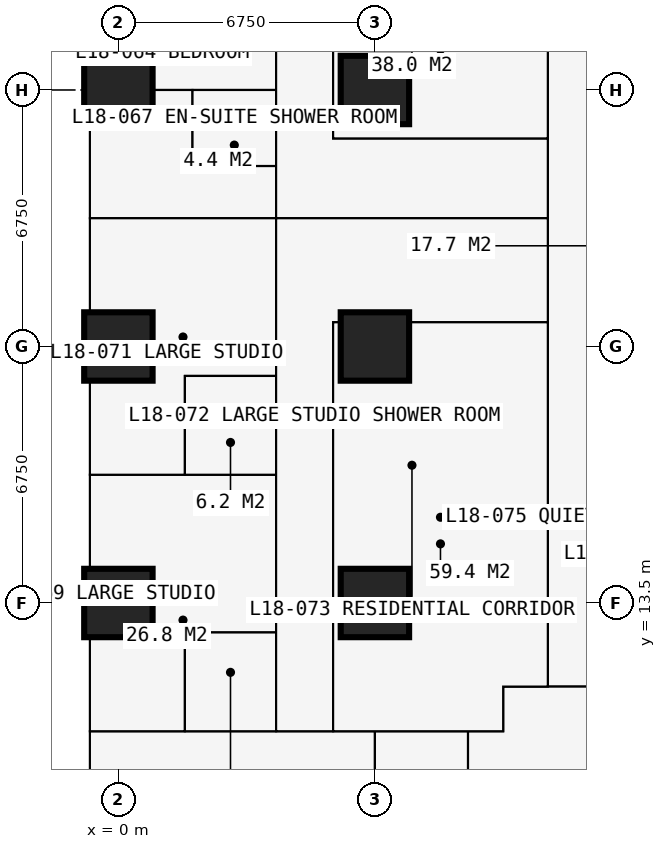
"""IFC4 building model, lengths in metres.
Left out: names, types, materials, properties, quantities, classifications, styles, units other than length and angle.
Written with IfcOpenShell. Run it as: python <this file> out.ifc"""

import sys

from ifc_helpers import new_model, si_unit, direction, frame, frame_2d, origin, origin_2d, place, context, subcontext, project, spatial, rectangle, extrude, element, fill, save


model = new_model("IFC4")
c1 = context("Model", 3, precision=1e-05, world=origin(), true_north=direction((0.0, 1.0)))
c2 = subcontext(c1, "Body", "Model", "MODEL_VIEW")
j1 = project(units=[si_unit("LENGTHUNIT", "METRE"), si_unit("PLANEANGLEUNIT", "RADIAN")], contexts=[c1])
p1 = place(None, origin())
s1 = spatial("IfcSite", under=j1, at=p1, CompositionType="ELEMENT")
p2 = place(p1, origin())
s2 = spatial("IfcBuilding", under=s1, at=p2, CompositionType="ELEMENT")
p3 = place(p2, frame((0.0, 0.0, 68.4)))
s3 = spatial("IfcBuildingStorey", under=s2, at=p3, CompositionType="ELEMENT", Elevation=68.4)
for number, where, z_axis, x_axis in (
    (1, (0.0, 13.5, 0.0), (0.0, 0.0, 1.0), (1.0, 0.0, 0.0)),
    (2, (0.0, 20.25, 0.0), (0.0, 0.0, 1.0), (1.0, 0.0, 0.0)),
    (3, (0.0, 27.0, 0.0), (0.0, 0.0, 1.0), (1.0, 0.0, 0.0)),
    (4, (6.75, 13.5, 0.0), (0.0, 0.0, 1.0), (1.0, 0.0, 0.0)),
    (5, (6.75, 20.25, 0.0), (0.0, 0.0, 1.0), (1.0, 0.0, 0.0)),
    (6, (6.75, 27.0, 0.0), (0.0, 0.0, 1.0), (1.0, 0.0, 0.0)),
):
    element("IfcColumn", number, at=place(p3, frame(where, z_axis=z_axis, x_axis=x_axis)), inside=s3, PredefinedType="COLUMN", context=c2, shape_type="SweptSolid", body=[
        extrude(rectangle(XDim=1.8, YDim=1.8, at=origin_2d()), origin(), (0.0, 0.0, 1.0), 3.6),
    ])
p4 = place(p3, frame((-0.75, 13.5, 0.0), z_axis=(0.0, 0.0, 1.0), x_axis=(0.0, 1.0, 0.0)))
e7 = element("IfcWall", 7, at=p4, inside=s3, PredefinedType="SOLIDWALL", context=c2, shape_type="SweptSolid", body=[
    extrude(rectangle(XDim=6.75, YDim=0.15, at=frame_2d((3.375, 0.0))), origin(), (0.0, 0.0, 1.0), 3.375),
])
p5 = place(p4, frame((0.962, 0.0, 0.0)))
e8 = element("IfcOpeningElement", 8, at=p5, cuts=e7, PredefinedType="OPENING", context=c2, shape_type="SweptSolid", body=[
    extrude(rectangle(XDim=1.0, YDim=2.2, at=frame_2d((0.5, 1.1))), frame((0.0, 0.085, 0.0), z_axis=(0.0, -1.0, 0.0), x_axis=(1.0, 0.0, 0.0)), (0.0, 0.0, 1.0), 0.17),
])
p6 = place(p4, frame((2.025, 0.0, 0.9)))
e9 = element("IfcOpeningElement", 9, at=p6, cuts=e7, PredefinedType="OPENING", context=c2, shape_type="SweptSolid", body=[
    extrude(rectangle(XDim=1.2, YDim=1.8, at=frame_2d((0.6, 0.9))), frame((0.0, 0.085, 0.0), z_axis=(0.0, -1.0, 0.0), x_axis=(1.0, 0.0, 0.0)), (0.0, 0.0, 1.0), 0.17),
])
p7 = place(p4, frame((4.788, 0.0, 0.0)))
e10 = element("IfcOpeningElement", 10, at=p7, cuts=e7, PredefinedType="OPENING", context=c2, shape_type="SweptSolid", body=[
    extrude(rectangle(XDim=1.0, YDim=2.2, at=frame_2d((0.5, 1.1))), frame((0.0, 0.085, 0.0), z_axis=(0.0, -1.0, 0.0), x_axis=(1.0, 0.0, 0.0)), (0.0, 0.0, 1.0), 0.17),
])
p8 = place(p4, frame((3.525, 0.0, 0.9)))
e11 = element("IfcOpeningElement", 11, at=p8, cuts=e7, PredefinedType="OPENING", context=c2, shape_type="SweptSolid", body=[
    extrude(rectangle(XDim=1.2, YDim=1.8, at=frame_2d((0.6, 0.9))), frame((0.0, 0.085, 0.0), z_axis=(0.0, -1.0, 0.0), x_axis=(1.0, 0.0, 0.0)), (0.0, 0.0, 1.0), 0.17),
])
p9 = place(p3, frame((-0.85, 16.875, 0.0), z_axis=(0.0, 0.0, 1.0), x_axis=(-1.0, 0.0, 0.0)))
e12 = element("IfcWall", 12, at=p9, inside=s3, PredefinedType="USERDEFINED", context=c2, shape_type="SweptSolid", body=[
    extrude(rectangle(XDim=2.2, YDim=1.0, at=frame_2d((1.1, 0.0))), origin(), (0.0, 0.0, 1.0), 0.9),
])
p10 = place(p3, frame((-0.734, 10.125, 0.0), z_axis=(0.0, 0.0, 1.0), x_axis=(1.0, 0.0, 0.0)))
e13 = element("IfcWall", 13, at=p10, inside=s3, PredefinedType="PARTITIONING", context=c2, shape_type="SweptSolid", body=[
    extrude(rectangle(XDim=10.859, YDim=0.15, at=frame_2d((5.429, 0.0))), origin(), (0.0, 0.0, 1.0), 3.375),
])
p11 = place(p10, frame((5.134, 0.0, 0.0)))
e14 = element("IfcOpeningElement", 14, at=p11, cuts=e13, PredefinedType="OPENING", context=c2, shape_type="SweptSolid", body=[
    extrude(rectangle(XDim=1.0, YDim=2.2, at=frame_2d((0.5, 1.1))), frame((0.0, 0.085, 0.0), z_axis=(0.0, -1.0, 0.0), x_axis=(1.0, 0.0, 0.0)), (0.0, 0.0, 1.0), 0.17),
])
p12 = place(p3, frame((-0.734, 16.875, 0.0), z_axis=(0.0, 0.0, 1.0), x_axis=(1.0, 0.0, 0.0)))
e15 = element("IfcWall", 15, at=p12, inside=s3, PredefinedType="PARTITIONING", context=c2, shape_type="SweptSolid", body=[
    extrude(rectangle(XDim=4.884, YDim=0.175, at=frame_2d((2.442, 0.0))), origin(), (0.0, 0.0, 1.0), 3.375),
])
p13 = place(p12, frame((3.234, 0.0, 0.0)))
e16 = element("IfcOpeningElement", 16, at=p13, cuts=e15, PredefinedType="OPENING", context=c2, shape_type="SweptSolid", body=[
    extrude(rectangle(XDim=0.9, YDim=2.2, at=frame_2d((0.45, 1.1))), frame((0.0, 0.097, 0.0), z_axis=(0.0, -1.0, 0.0), x_axis=(1.0, 0.0, 0.0)), (0.0, 0.0, 1.0), 0.195),
])
p14 = place(p3, frame((-0.734, 23.625, 0.0), z_axis=(0.0, 0.0, 1.0), x_axis=(1.0, 0.0, 0.0)))
e17 = element("IfcWall", 17, at=p14, inside=s3, PredefinedType="PARTITIONING", context=c2, shape_type="SweptSolid", body=[
    extrude(rectangle(XDim=12.034, YDim=0.15, at=frame_2d((6.017, 0.0))), origin(), (0.0, 0.0, 1.0), 3.375),
])
p15 = place(p3, frame((-0.734, 27.0, 0.0), z_axis=(0.0, 0.0, 1.0), x_axis=(1.0, 0.0, 0.0)))
e18 = element("IfcWall", 18, at=p15, inside=s3, PredefinedType="PARTITIONING", context=c2, shape_type="SweptSolid", body=[
    extrude(rectangle(XDim=4.884, YDim=0.175, at=frame_2d((2.442, 0.0))), origin(), (0.0, 0.0, 1.0), 2.61),
])
p16 = place(p15, frame((3.334, 0.0, 0.0)))
e19 = element("IfcOpeningElement", 19, at=p16, cuts=e18, PredefinedType="OPENING", context=c2, shape_type="SweptSolid", body=[
    extrude(rectangle(XDim=0.9, YDim=2.2, at=frame_2d((0.45, 1.1))), frame((0.0, 0.097, 0.0), z_axis=(0.0, -1.0, 0.0), x_axis=(1.0, 0.0, 0.0)), (0.0, 0.0, 1.0), 0.195),
])
p17 = place(p3, frame((1.75, 10.125, 0.0), z_axis=(0.0, 0.0, 1.0), x_axis=(0.0, 1.0, 0.0)))
e20 = element("IfcWall", 20, at=p17, inside=s3, PredefinedType="PARTITIONING", context=c2, shape_type="SweptSolid", body=[
    extrude(rectangle(XDim=2.6, YDim=0.1, at=frame_2d((1.3, 0.0))), origin(), (0.0, 0.0, 1.0), 3.375),
])
p18 = place(p17, frame((0.85, 0.0, 0.0)))
e21 = element("IfcOpeningElement", 21, at=p18, cuts=e20, PredefinedType="OPENING", context=c2, shape_type="SweptSolid", body=[
    extrude(rectangle(XDim=0.9, YDim=2.2, at=frame_2d((0.45, 1.1))), frame((0.0, 0.06, 0.0), z_axis=(0.0, -1.0, 0.0), x_axis=(1.0, 0.0, 0.0)), (0.0, 0.0, 1.0), 0.12),
])
p19 = place(p3, frame((1.75, 12.725, 0.0), z_axis=(0.0, 0.0, 1.0), x_axis=(1.0, 0.0, 0.0)))
e22 = element("IfcWall", 22, at=p19, inside=s3, PredefinedType="PARTITIONING", context=c2, shape_type="SweptSolid", body=[
    extrude(rectangle(XDim=2.4, YDim=0.1, at=frame_2d((1.2, 0.0))), origin(), (0.0, 0.0, 1.0), 3.375),
])
p20 = place(p3, frame((1.75, 16.875, 0.0), z_axis=(0.0, 0.0, 1.0), x_axis=(0.0, 1.0, 0.0)))
e23 = element("IfcWall", 23, at=p20, inside=s3, PredefinedType="PARTITIONING", context=c2, shape_type="SweptSolid", body=[
    extrude(rectangle(XDim=2.6, YDim=0.1, at=frame_2d((1.3, 0.0))), origin(), (0.0, 0.0, 1.0), 3.375),
])
p21 = place(p3, frame((1.75, 19.475, 0.0), z_axis=(0.0, 0.0, 1.0), x_axis=(1.0, 0.0, 0.0)))
e24 = element("IfcWall", 24, at=p21, inside=s3, PredefinedType="PARTITIONING", context=c2, shape_type="SweptSolid", body=[
    extrude(rectangle(XDim=2.4, YDim=0.1, at=frame_2d((1.2, 0.0))), origin(), (0.0, 0.0, 1.0), 3.375),
])
p22 = place(p3, frame((1.95, 25.0, 0.0), z_axis=(0.0, 0.0, 1.0), x_axis=(0.0, 1.0, 0.0)))
e25 = element("IfcWall", 25, at=p22, inside=s3, PredefinedType="PARTITIONING", context=c2, shape_type="SweptSolid", body=[
    extrude(rectangle(XDim=2.0, YDim=0.1, at=frame_2d((1.0, 0.0))), origin(), (0.0, 0.0, 1.0), 3.375),
])
p23 = place(p3, frame((1.95, 25.0, 0.0), z_axis=(0.0, 0.0, 1.0), x_axis=(1.0, 0.0, 0.0)))
e26 = element("IfcWall", 26, at=p23, inside=s3, PredefinedType="PARTITIONING", context=c2, shape_type="SweptSolid", body=[
    extrude(rectangle(XDim=2.2, YDim=0.1, at=frame_2d((1.1, 0.0))), origin(), (0.0, 0.0, 1.0), 3.375),
])
p24 = place(p3, frame((4.15, 10.125, 0.0), z_axis=(0.0, 0.0, 1.0), x_axis=(0.0, 1.0, 0.0)))
e27 = element("IfcWall", 27, at=p24, inside=s3, PredefinedType="PARTITIONING", context=c2, shape_type="SweptSolid", body=[
    extrude(rectangle(XDim=23.625, YDim=0.15, at=frame_2d((11.812, 0.0))), origin(), (0.0, 0.0, 1.0), 3.375),
])
p25 = place(p24, frame((20.5, 0.0, 0.0)))
e28 = element("IfcOpeningElement", 28, at=p25, cuts=e27, PredefinedType="OPENING", context=c2, shape_type="SweptSolid", body=[
    extrude(rectangle(XDim=0.95, YDim=2.2, at=frame_2d((0.475, 1.1))), frame((0.0, 0.085, 0.0), z_axis=(0.0, -1.0, 0.0), x_axis=(1.0, 0.0, 0.0)), (0.0, 0.0, 1.0), 0.17),
])
p26 = place(p24, frame((17.125, 0.0, 0.0)))
e29 = element("IfcOpeningElement", 29, at=p26, cuts=e27, PredefinedType="OPENING", context=c2, shape_type="SweptSolid", body=[
    extrude(rectangle(XDim=0.95, YDim=2.2, at=frame_2d((0.475, 1.1))), frame((0.0, 0.085, 0.0), z_axis=(0.0, -1.0, 0.0), x_axis=(1.0, 0.0, 0.0)), (0.0, 0.0, 1.0), 0.17),
])
p27 = place(p24, frame((13.7, 0.0, 0.0)))
e30 = element("IfcOpeningElement", 30, at=p27, cuts=e27, PredefinedType="OPENING", context=c2, shape_type="SweptSolid", body=[
    extrude(rectangle(XDim=0.95, YDim=2.2, at=frame_2d((0.475, 1.1))), frame((0.0, 0.085, 0.0), z_axis=(0.0, -1.0, 0.0), x_axis=(1.0, 0.0, 0.0)), (0.0, 0.0, 1.0), 0.17),
])
p28 = place(p24, frame((4.2, 0.0, 0.0)))
e31 = element("IfcOpeningElement", 31, at=p28, cuts=e27, PredefinedType="OPENING", context=c2, shape_type="SweptSolid", body=[
    extrude(rectangle(XDim=0.95, YDim=2.2, at=frame_2d((0.475, 1.1))), frame((0.0, 0.085, 0.0), z_axis=(0.0, -1.0, 0.0), x_axis=(1.0, 0.0, 0.0)), (0.0, 0.0, 1.0), 0.17),
])
p29 = place(p24, frame((10.95, 0.0, 0.0)))
e32 = element("IfcOpeningElement", 32, at=p29, cuts=e27, PredefinedType="OPENING", context=c2, shape_type="SweptSolid", body=[
    extrude(rectangle(XDim=0.95, YDim=2.2, at=frame_2d((0.475, 1.1))), frame((0.0, 0.085, 0.0), z_axis=(0.0, -1.0, 0.0), x_axis=(1.0, 0.0, 0.0)), (0.0, 0.0, 1.0), 0.17),
])
p30 = place(p3, frame((5.65, 10.125, 0.0), z_axis=(0.0, 0.0, 1.0), x_axis=(0.0, 1.0, 0.0)))
e33 = element("IfcWall", 33, at=p30, inside=s3, PredefinedType="PARTITIONING", context=c2, shape_type="SweptSolid", body=[
    extrude(rectangle(XDim=10.762, YDim=0.15, at=frame_2d((5.381, 0.0))), origin(), (0.0, 0.0, 1.0), 3.375),
])
p31 = place(p30, frame((4.9, 0.0, 0.0)))
e34 = element("IfcOpeningElement", 34, at=p31, cuts=e33, PredefinedType="OPENING", context=c2, shape_type="SweptSolid", body=[
    extrude(rectangle(XDim=0.95, YDim=2.2, at=frame_2d((0.475, 1.1))), frame((0.0, 0.085, 0.0), z_axis=(0.0, -1.0, 0.0), x_axis=(1.0, 0.0, 0.0)), (0.0, 0.0, 1.0), 0.17),
])
p32 = place(p3, frame((5.65, 20.887, 0.0), z_axis=(0.0, 0.0, 1.0), x_axis=(1.0, 0.0, 0.0)))
e35 = element("IfcWall", 35, at=p32, inside=s3, PredefinedType="PARTITIONING", context=c2, shape_type="SweptSolid", body=[
    extrude(rectangle(XDim=5.65, YDim=0.15, at=frame_2d((2.825, 0.0))), origin(), (0.0, 0.0, 1.0), 3.375),
])
p33 = place(p3, frame((5.65, 25.725, 0.0), z_axis=(0.0, 0.0, 1.0), x_axis=(0.0, 1.0, 0.0)))
e36 = element("IfcWall", 36, at=p33, inside=s3, PredefinedType="PARTITIONING", context=c2, shape_type="SweptSolid", body=[
    extrude(rectangle(XDim=5.575, YDim=0.15, at=frame_2d((2.788, 0.0))), origin(), (0.0, 0.0, 1.0), 3.375),
])
p34 = place(p3, frame((5.65, 25.725, 0.0), z_axis=(0.0, 0.0, 1.0), x_axis=(1.0, 0.0, 0.0)))
e37 = element("IfcWall", 37, at=p34, inside=s3, PredefinedType="PARTITIONING", context=c2, shape_type="SweptSolid", body=[
    extrude(rectangle(XDim=5.65, YDim=0.15, at=frame_2d((2.825, 0.0))), origin(), (0.0, 0.0, 1.0), 3.375),
])
p35 = place(p3, frame((6.75, -0.734, 0.0), z_axis=(0.0, 0.0, 1.0), x_axis=(0.0, 1.0, 0.0)))
e38 = element("IfcWall", 38, at=p35, inside=s3, PredefinedType="PARTITIONING", context=c2, shape_type="SweptSolid", body=[
    extrude(rectangle(XDim=10.859, YDim=0.15, at=frame_2d((5.429, 0.0))), origin(), (0.0, 0.0, 1.0), 2.877),
])
p36 = place(p3, frame((9.2, 5.65, 0.0), z_axis=(0.0, 0.0, 1.0), x_axis=(0.0, 1.0, 0.0)))
e39 = element("IfcWall", 39, at=p36, inside=s3, PredefinedType="PARTITIONING", context=c2, shape_type="SweptSolid", body=[
    extrude(rectangle(XDim=4.475, YDim=0.15, at=frame_2d((2.238, 0.0))), origin(), (0.0, 0.0, 1.0), 3.375),
])
p37 = place(p3, frame((10.125, 10.125, 0.0), z_axis=(0.0, 0.0, 1.0), x_axis=(0.0, 1.0, 0.0)))
e40 = element("IfcWall", 40, at=p37, inside=s3, PredefinedType="PARTITIONING", context=c2, shape_type="SweptSolid", body=[
    extrude(rectangle(XDim=1.175, YDim=0.15, at=frame_2d((0.587, 0.0))), origin(), (0.0, 0.0, 1.0), 3.375),
])
p38 = place(p3, frame((10.125, 11.3, 0.0), z_axis=(0.0, 0.0, 1.0), x_axis=(1.0, 0.0, 0.0)))
e41 = element("IfcWall", 41, at=p38, inside=s3, PredefinedType="PARTITIONING", context=c2, shape_type="SweptSolid", body=[
    extrude(rectangle(XDim=20.675, YDim=0.15, at=frame_2d((10.337, 0.0))), origin(), (0.0, 0.0, 1.0), 3.375),
])
p39 = place(p38, frame((8.375, 0.0, 0.0)))
e42 = element("IfcOpeningElement", 42, at=p39, cuts=e41, PredefinedType="OPENING", context=c2, shape_type="SweptSolid", body=[
    extrude(rectangle(XDim=1.0, YDim=2.2, at=frame_2d((0.5, 1.1))), frame((0.0, 0.085, 0.0), z_axis=(0.0, -1.0, 0.0), x_axis=(1.0, 0.0, 0.0)), (0.0, 0.0, 1.0), 0.17),
])
p40 = place(p38, frame((10.975, 0.0, 0.0)))
e43 = element("IfcOpeningElement", 43, at=p40, cuts=e41, PredefinedType="OPENING", context=c2, shape_type="SweptSolid", body=[
    extrude(rectangle(XDim=1.0, YDim=2.2, at=frame_2d((0.5, 1.1))), frame((0.0, 0.085, 0.0), z_axis=(0.0, -1.0, 0.0), x_axis=(1.0, 0.0, 0.0)), (0.0, 0.0, 1.0), 0.17),
])
p41 = place(p38, frame((3.925, 0.0, 0.0)))
e44 = element("IfcOpeningElement", 44, at=p41, cuts=e41, PredefinedType="OPENING", context=c2, shape_type="SweptSolid", body=[
    extrude(rectangle(XDim=0.95, YDim=2.2, at=frame_2d((0.475, 1.1))), frame((0.0, 0.085, 0.0), z_axis=(0.0, -1.0, 0.0), x_axis=(1.0, 0.0, 0.0)), (0.0, 0.0, 1.0), 0.17),
])
p42 = place(p3, frame((11.3, 11.3, 0.0), z_axis=(0.0, 0.0, 1.0), x_axis=(0.0, 1.0, 0.0)))
e45 = element("IfcWall", 45, at=p42, inside=s3, PredefinedType="PARTITIONING", context=c2, shape_type="SweptSolid", body=[
    extrude(rectangle(XDim=19.075, YDim=0.15, at=frame_2d((9.538, 0.0))), origin(), (0.0, 0.0, 1.0), 3.375),
])
p43 = place(p42, frame((12.875, 0.0, 0.0)))
e46 = element("IfcOpeningElement", 46, at=p43, cuts=e45, PredefinedType="OPENING", context=c2, shape_type="SweptSolid", body=[
    extrude(rectangle(XDim=1.0, YDim=2.2, at=frame_2d((0.5, 1.1))), frame((0.0, 0.085, 0.0), z_axis=(0.0, -1.0, 0.0), x_axis=(1.0, 0.0, 0.0)), (0.0, 0.0, 1.0), 0.17),
])
p44 = place(p42, frame((10.438, 0.0, 0.0)))
e47 = element("IfcOpeningElement", 47, at=p44, cuts=e45, PredefinedType="OPENING", context=c2, shape_type="SweptSolid", body=[
    extrude(rectangle(XDim=1.0, YDim=2.2, at=frame_2d((0.5, 1.1))), frame((0.0, 0.085, 0.0), z_axis=(0.0, -1.0, 0.0), x_axis=(1.0, 0.0, 0.0)), (0.0, 0.0, 1.0), 0.17),
])
p45 = place(p42, frame((15.675, 0.0, 0.0)))
e48 = element("IfcOpeningElement", 48, at=p45, cuts=e45, PredefinedType="OPENING", context=c2, shape_type="SweptSolid", body=[
    extrude(rectangle(XDim=0.95, YDim=2.2, at=frame_2d((0.475, 1.1))), frame((0.0, 0.085, 0.0), z_axis=(0.0, -1.0, 0.0), x_axis=(1.0, 0.0, 0.0)), (0.0, 0.0, 1.0), 0.17),
])
p46 = place(p5, origin())
e49 = element("IfcDoor", 49, at=p46, inside=s3, OperationType="SINGLE_SWING_LEFT", PredefinedType="DOOR", context=c2, shape_type="SweptSolid", body=[
    extrude(rectangle(XDim=1.0, YDim=2.2, at=frame_2d((0.5, 1.1))), frame((0.0, 0.025, 0.0), z_axis=(0.0, -1.0, 0.0), x_axis=(1.0, 0.0, 0.0)), (0.0, 0.0, 1.0), 0.05),
])
fill(e8, e49)
p47 = place(p6, origin())
e50 = element("IfcWindow", 50, at=p47, inside=s3, PartitioningType="SINGLE_PANEL", PredefinedType="WINDOW", context=c2, shape_type="SweptSolid", body=[
    extrude(rectangle(XDim=1.2, YDim=1.8, at=frame_2d((0.6, 0.9))), frame((0.0, 0.03, 0.0), z_axis=(0.0, -1.0, 0.0), x_axis=(1.0, 0.0, 0.0)), (0.0, 0.0, 1.0), 0.06),
])
fill(e9, e50)
p48 = place(p7, origin())
e51 = element("IfcDoor", 51, at=p48, inside=s3, OperationType="SINGLE_SWING_RIGHT", PredefinedType="DOOR", context=c2, shape_type="SweptSolid", body=[
    extrude(rectangle(XDim=1.0, YDim=2.2, at=frame_2d((0.5, 1.1))), frame((0.0, 0.025, 0.0), z_axis=(0.0, -1.0, 0.0), x_axis=(1.0, 0.0, 0.0)), (0.0, 0.0, 1.0), 0.05),
])
fill(e10, e51)
p49 = place(p8, origin())
e52 = element("IfcWindow", 52, at=p49, inside=s3, PartitioningType="SINGLE_PANEL", PredefinedType="WINDOW", context=c2, shape_type="SweptSolid", body=[
    extrude(rectangle(XDim=1.2, YDim=1.8, at=frame_2d((0.6, 0.9))), frame((0.0, 0.03, 0.0), z_axis=(0.0, -1.0, 0.0), x_axis=(1.0, 0.0, 0.0)), (0.0, 0.0, 1.0), 0.06),
])
fill(e11, e52)
p50 = place(p11, origin())
e53 = element("IfcDoor", 53, at=p50, inside=s3, OperationType="SINGLE_SWING_LEFT", PredefinedType="DOOR", context=c2, shape_type="SweptSolid", body=[
    extrude(rectangle(XDim=1.0, YDim=2.2, at=frame_2d((0.5, 1.1))), frame((0.0, 0.025, 0.0), z_axis=(0.0, -1.0, 0.0), x_axis=(1.0, 0.0, 0.0)), (0.0, 0.0, 1.0), 0.05),
])
fill(e14, e53)
p51 = place(p26, origin())
e54 = element("IfcDoor", 54, at=p51, inside=s3, OperationType="SINGLE_SWING_LEFT", PredefinedType="DOOR", context=c2, shape_type="SweptSolid", body=[
    extrude(rectangle(XDim=0.95, YDim=2.2, at=frame_2d((0.475, 1.1))), frame((0.0, 0.025, 0.0), z_axis=(0.0, -1.0, 0.0), x_axis=(1.0, 0.0, 0.0)), (0.0, 0.0, 1.0), 0.05),
])
fill(e29, e54)
p52 = place(p27, origin())
e55 = element("IfcDoor", 55, at=p52, inside=s3, OperationType="SINGLE_SWING_LEFT", PredefinedType="DOOR", context=c2, shape_type="SweptSolid", body=[
    extrude(rectangle(XDim=0.95, YDim=2.2, at=frame_2d((0.475, 1.1))), frame((0.0, 0.025, 0.0), z_axis=(0.0, -1.0, 0.0), x_axis=(1.0, 0.0, 0.0)), (0.0, 0.0, 1.0), 0.05),
])
fill(e30, e55)
p53 = place(p16, origin())
e56 = element("IfcDoor", 56, at=p53, inside=s3, OperationType="SINGLE_SWING_RIGHT", PredefinedType="DOOR", context=c2, shape_type="SweptSolid", body=[
    extrude(rectangle(XDim=0.9, YDim=2.2, at=frame_2d((0.45, 1.1))), frame((0.0, 0.025, 0.0), z_axis=(0.0, -1.0, 0.0), x_axis=(1.0, 0.0, 0.0)), (0.0, 0.0, 1.0), 0.05),
])
fill(e19, e56)
p54 = place(p43, origin())
e57 = element("IfcDoor", 57, at=p54, inside=s3, OperationType="SINGLE_SWING_LEFT", PredefinedType="DOOR", context=c2, shape_type="SweptSolid", body=[
    extrude(rectangle(XDim=1.0, YDim=2.2, at=frame_2d((0.5, 1.1))), frame((0.0, 0.025, 0.0), z_axis=(0.0, -1.0, 0.0), x_axis=(1.0, 0.0, 0.0)), (0.0, 0.0, 1.0), 0.05),
])
fill(e46, e57)
p55 = place(p28, origin())
e58 = element("IfcDoor", 58, at=p55, inside=s3, OperationType="SINGLE_SWING_LEFT", PredefinedType="DOOR", context=c2, shape_type="SweptSolid", body=[
    extrude(rectangle(XDim=0.95, YDim=2.2, at=frame_2d((0.475, 1.1))), frame((0.0, 0.025, 0.0), z_axis=(0.0, -1.0, 0.0), x_axis=(1.0, 0.0, 0.0)), (0.0, 0.0, 1.0), 0.05),
])
fill(e31, e58)
p56 = place(p18, origin())
e59 = element("IfcDoor", 59, at=p56, inside=s3, OperationType="SINGLE_SWING_RIGHT", PredefinedType="DOOR", context=c2, shape_type="SweptSolid", body=[
    extrude(rectangle(XDim=0.9, YDim=2.2, at=frame_2d((0.45, 1.1))), frame((0.0, 0.025, 0.0), z_axis=(0.0, -1.0, 0.0), x_axis=(1.0, 0.0, 0.0)), (0.0, 0.0, 1.0), 0.05),
])
fill(e21, e59)
p57 = place(p29, origin())
e60 = element("IfcDoor", 60, at=p57, inside=s3, OperationType="SINGLE_SWING_LEFT", PredefinedType="DOOR", context=c2, shape_type="SweptSolid", body=[
    extrude(rectangle(XDim=0.95, YDim=2.2, at=frame_2d((0.475, 1.1))), frame((0.0, 0.025, 0.0), z_axis=(0.0, -1.0, 0.0), x_axis=(1.0, 0.0, 0.0)), (0.0, 0.0, 1.0), 0.05),
])
fill(e32, e60)
p58 = place(p13, origin())
e61 = element("IfcDoor", 61, at=p58, inside=s3, OperationType="SINGLE_SWING_RIGHT", PredefinedType="DOOR", context=c2, shape_type="SweptSolid", body=[
    extrude(rectangle(XDim=0.9, YDim=2.2, at=frame_2d((0.45, 1.1))), frame((0.0, 0.025, 0.0), z_axis=(0.0, -1.0, 0.0), x_axis=(1.0, 0.0, 0.0)), (0.0, 0.0, 1.0), 0.05),
])
fill(e16, e61)
p59 = place(p44, origin())
e62 = element("IfcDoor", 62, at=p59, inside=s3, OperationType="SINGLE_SWING_LEFT", PredefinedType="DOOR", context=c2, shape_type="SweptSolid", body=[
    extrude(rectangle(XDim=1.0, YDim=2.2, at=frame_2d((0.5, 1.1))), frame((0.0, 0.025, 0.0), z_axis=(0.0, -1.0, 0.0), x_axis=(1.0, 0.0, 0.0)), (0.0, 0.0, 1.0), 0.05),
])
fill(e47, e62)
p60 = place(p45, origin())
e63 = element("IfcDoor", 63, at=p60, inside=s3, OperationType="SINGLE_SWING_LEFT", PredefinedType="DOOR", context=c2, shape_type="SweptSolid", body=[
    extrude(rectangle(XDim=0.95, YDim=2.2, at=frame_2d((0.475, 1.1))), frame((0.0, 0.025, 0.0), z_axis=(0.0, -1.0, 0.0), x_axis=(1.0, 0.0, 0.0)), (0.0, 0.0, 1.0), 0.05),
])
fill(e48, e63)
p61 = place(p31, origin())
e64 = element("IfcDoor", 64, at=p61, inside=s3, OperationType="SINGLE_SWING_LEFT", PredefinedType="DOOR", context=c2, shape_type="SweptSolid", body=[
    extrude(rectangle(XDim=0.95, YDim=2.2, at=frame_2d((0.475, 1.1))), frame((0.0, 0.025, 0.0), z_axis=(0.0, -1.0, 0.0), x_axis=(1.0, 0.0, 0.0)), (0.0, 0.0, 1.0), 0.05),
])
fill(e34, e64)
save(model, sys.argv[1])
